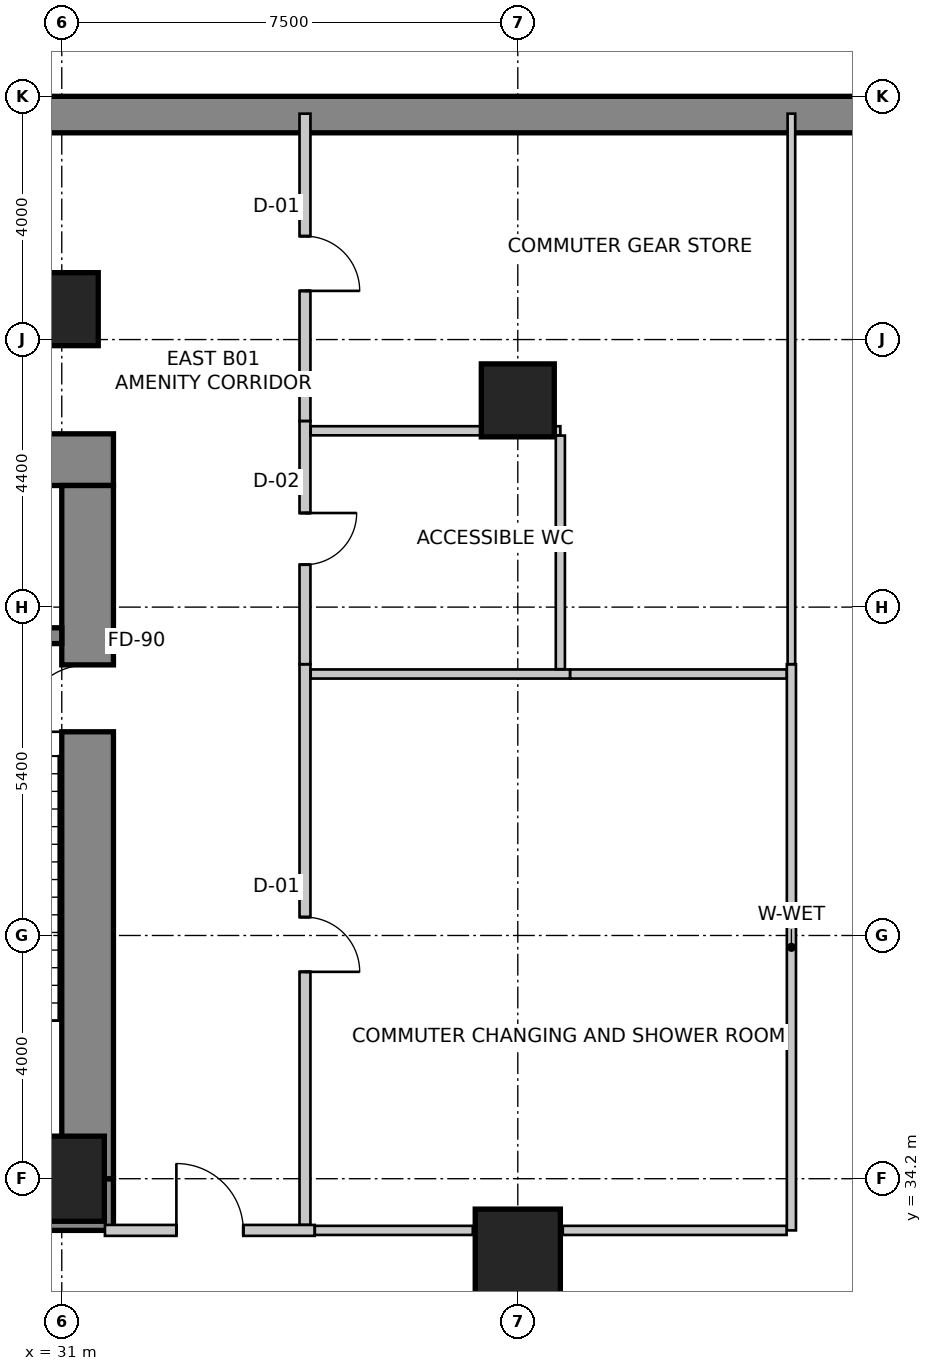
"""IFC4 building model, lengths in metres.
Left out: names, types, materials, properties, quantities, classifications, styles, units other than length and angle.
Written with IfcOpenShell. Run it as: python <this file> out.ifc"""

import sys

from ifc_helpers import new_model, si_unit, direction, frame, frame_2d, origin, origin_2d, place, context, subcontext, project, spatial, rectangle, extrude, source, transform, mapped, element, fill, save


model = new_model("IFC4")
c1 = context("Model", 3, precision=1e-05, world=origin(), true_north=direction((0.0, 1.0)))
c2 = subcontext(c1, "Body", "Model", "MODEL_VIEW")
j1 = project(units=[si_unit("LENGTHUNIT", "METRE"), si_unit("PLANEANGLEUNIT", "RADIAN")], contexts=[c1])
p1 = place(None, origin())
s1 = spatial("IfcSite", under=j1, at=p1, CompositionType="ELEMENT")
p2 = place(p1, origin())
s2 = spatial("IfcBuilding", under=s1, at=p2, CompositionType="ELEMENT")
p3 = place(p2, frame((0.0, 0.0, -5.4)))
s3 = spatial("IfcBuildingStorey", under=s2, at=p3, CompositionType="ELEMENT", Elevation=-5.4)
p4 = place(p3, frame((15.75, 46.025, 0.0), z_axis=(0.0, 0.0, 1.0), x_axis=(1.0, 0.0, 0.0)))
e1 = element("IfcWall", 1, at=p4, inside=s3, PredefinedType="SHEAR", context=c2, shape_type="SweptSolid", body=[
    extrude(rectangle(XDim=16.1, YDim=0.85, at=frame_2d((8.05, 0.0))), origin(), (0.0, 0.0, 1.0), 5.4),
])
p5 = place(p3, frame((15.75, 33.775, 0.0), z_axis=(0.0, 0.0, 1.0), x_axis=(1.0, 0.0, 0.0)))
e2 = element("IfcWall", 2, at=p5, inside=s3, PredefinedType="SHEAR", context=c2, shape_type="SweptSolid", body=[
    extrude(rectangle(XDim=16.1, YDim=0.85, at=frame_2d((8.05, 0.0))), origin(), (0.0, 0.0, 1.0), 5.4),
])
m1 = source(origin(), c2, "Body", "SweptSolid", [
    extrude(rectangle(XDim=1.3, YDim=2.15, at=frame_2d((0.65, 1.075))), frame((0.0, 0.435, 0.0), z_axis=(0.0, -1.0, 0.0), x_axis=(1.0, 0.0, 0.0)), (0.0, 0.0, 1.0), 0.87),
])
p6 = place(p5, frame((10.18, 0.0, 0.0)))
e3 = element("IfcOpeningElement", 3, at=p6, cuts=e2, PredefinedType="OPENING", context=c2, shape_type="MappedRepresentation", body=[
    mapped(m1, transform((0.0, 0.0, 0.0), scale=1.0)),
])
p7 = place(p3, frame((31.425, 34.2, 0.0), z_axis=(0.0, 0.0, 1.0), x_axis=(0.0, 1.0, 0.0)))
e4 = element("IfcWall", 4, at=p7, inside=s3, PredefinedType="SHEAR", context=c2, shape_type="SweptSolid", body=[
    extrude(rectangle(XDim=11.4, YDim=0.85, at=frame_2d((5.7, 0.0))), origin(), (0.0, 0.0, 1.0), 5.4),
])
m2 = source(origin(), c2, "Body", "SweptSolid", [
    extrude(rectangle(XDim=1.1, YDim=2.15, at=frame_2d((0.55, 1.075))), frame((0.0, 0.435, 0.0), z_axis=(0.0, -1.0, 0.0), x_axis=(1.0, 0.0, 0.0)), (0.0, 0.0, 1.0), 0.87),
])
p8 = place(p7, frame((7.35, 0.0, 0.0)))
e5 = element("IfcOpeningElement", 5, at=p8, cuts=e4, PredefinedType="OPENING", context=c2, shape_type="MappedRepresentation", body=[
    mapped(m2, transform((0.0, 0.0, 0.0), scale=1.0)),
])
p9 = place(p3, frame((27.5, 43.13, 0.0), z_axis=(0.0, 0.0, 1.0), x_axis=(1.0, 0.0, 0.0)))
e6 = element("IfcWall", 6, at=p9, inside=s3, PredefinedType="SHEAR", context=c2, shape_type="SweptSolid", body=[
    extrude(rectangle(XDim=3.5, YDim=0.26, at=frame_2d((1.75, 0.0))), origin(), (0.0, 0.0, 1.0), 5.4),
])
p10 = place(p3, frame((65.5, 51.7, 0.0), z_axis=(0.0, 0.0, 1.0), x_axis=(-1.0, 0.0, 0.0)))
e7 = element("IfcWall", 7, at=p10, inside=s3, PredefinedType="SHEAR", context=c2, shape_type="SweptSolid", body=[
    extrude(rectangle(XDim=61.0, YDim=0.6, at=frame_2d((30.5, 0.0))), origin(), (0.0, 0.0, 1.0), 5.4),
])
m3 = source(origin(), c2, "Body", "SweptSolid", [
    extrude(rectangle(XDim=1.4, YDim=1.4, at=origin_2d()), origin(), (0.0, 0.0, 1.0), 5.4),
])
for number, where, z_axis, x_axis in (
    (8, (31.0, 34.2, 0.0), (0.0, 0.0, 1.0), (1.0, 0.0, 0.0)),
    (9, (38.5, 33.0, 0.0), (0.0, 0.0, 1.0), (1.0, 0.0, 0.0)),
):
    element("IfcColumn", number, at=place(p3, frame(where, z_axis=z_axis, x_axis=x_axis)), inside=s3, PredefinedType="COLUMN", context=c2, shape_type="MappedRepresentation", body=[
        mapped(m3, transform((0.0, 0.0, 0.0), scale=1.0)),
    ])
m4 = source(origin(), c2, "Body", "SweptSolid", [
    extrude(rectangle(XDim=1.2, YDim=1.2, at=origin_2d()), origin(), (0.0, 0.0, 1.0), 5.4),
])
for number, where, z_axis, x_axis in (
    (10, (31.0, 48.5, 0.0), (0.0, 0.0, 1.0), (1.0, 0.0, 0.0)),
    (11, (38.5, 47.0, 0.0), (0.0, 0.0, 1.0), (1.0, 0.0, 0.0)),
):
    element("IfcColumn", number, at=place(p3, frame(where, z_axis=z_axis, x_axis=x_axis)), inside=s3, PredefinedType="COLUMN", context=c2, shape_type="MappedRepresentation", body=[
        mapped(m4, transform((0.0, 0.0, 0.0), scale=1.0)),
    ])
p11 = place(p3, frame((31.71, 33.35, 0.0), z_axis=(0.0, 0.0, 1.0), x_axis=(1.0, 0.0, 0.0)))
e12 = element("IfcWall", 12, at=p11, inside=s3, PredefinedType="PARTITIONING", context=c2, shape_type="SweptSolid", body=[
    extrude(rectangle(XDim=3.45, YDim=0.18, at=frame_2d((1.725, 0.0))), origin(), (0.0, 0.0, 1.0), 5.1),
])
m5 = source(origin(), c2, "Body", "SweptSolid", [
    extrude(rectangle(XDim=1.1, YDim=2.15, at=frame_2d((0.55, 1.075))), frame((0.0, 0.1, 0.0), z_axis=(0.0, -1.0, 0.0), x_axis=(1.0, 0.0, 0.0)), (0.0, 0.0, 1.0), 0.2),
])
p12 = place(p11, frame((1.175, 0.0, 0.0)))
e13 = element("IfcOpeningElement", 13, at=p12, cuts=e12, PredefinedType="OPENING", context=c2, shape_type="MappedRepresentation", body=[
    mapped(m5, transform((0.0, 0.0, 0.0), scale=1.0)),
])
p13 = place(p3, frame((43.0, 33.35, 0.0), z_axis=(0.0, 0.0, 1.0), x_axis=(0.0, 1.0, 0.0)))
e14 = element("IfcWall", 14, at=p13, inside=s3, PredefinedType="PARTITIONING", context=c2, shape_type="SweptSolid", body=[
    extrude(rectangle(XDim=9.31, YDim=0.15, at=frame_2d((4.655, 0.0))), origin(), (0.0, 0.0, 1.0), 3.892),
])
p14 = place(p3, frame((39.24, 33.35, 0.0), z_axis=(0.0, 0.0, 1.0), x_axis=(1.0, 0.0, 0.0)))
e15 = element("IfcWall", 15, at=p14, inside=s3, PredefinedType="PARTITIONING", context=c2, shape_type="SweptSolid", body=[
    extrude(rectangle(XDim=3.681, YDim=0.15, at=frame_2d((1.84, 0.0))), origin(), (0.0, 0.0, 1.0), 3.892),
])
p15 = place(p3, frame((35.162, 33.35, 0.0), z_axis=(0.0, 0.0, 1.0), x_axis=(1.0, 0.0, 0.0)))
e16 = element("IfcWall", 16, at=p15, inside=s3, PredefinedType="PARTITIONING", context=c2, shape_type="SweptSolid", body=[
    extrude(rectangle(XDim=2.598, YDim=0.15, at=frame_2d((1.299, 0.0))), origin(), (0.0, 0.0, 1.0), 5.1),
])
p16 = place(p3, frame((43.0, 42.662, 0.0), z_axis=(0.0, 0.0, 1.0), x_axis=(0.0, 1.0, 0.0)))
e17 = element("IfcWall", 17, at=p16, inside=s3, PredefinedType="PARTITIONING", context=c2, shape_type="SweptSolid", body=[
    extrude(rectangle(XDim=9.053, YDim=0.125, at=frame_2d((4.526, 0.0))), origin(), (0.0, 0.0, 1.0), 4.142),
])
p17 = place(p3, frame((35.0, 42.66, 0.0), z_axis=(0.0, 0.0, 1.0), x_axis=(0.0, -1.0, 0.0)))
e18 = element("IfcWall", 18, at=p17, inside=s3, PredefinedType="PARTITIONING", context=c2, shape_type="SweptSolid", body=[
    extrude(rectangle(XDim=9.216, YDim=0.18, at=frame_2d((4.608, 0.0))), origin(), (0.0, 0.0, 1.0), 5.1),
])
m6 = source(origin(), c2, "Body", "SweptSolid", [
    extrude(rectangle(XDim=0.9, YDim=2.15, at=frame_2d((0.45, 1.075))), frame((0.0, 0.1, 0.0), z_axis=(0.0, -1.0, 0.0), x_axis=(1.0, 0.0, 0.0)), (0.0, 0.0, 1.0), 0.2),
])
p18 = place(p17, frame((4.158, 0.0, 0.0)))
e19 = element("IfcOpeningElement", 19, at=p18, cuts=e18, PredefinedType="OPENING", context=c2, shape_type="MappedRepresentation", body=[
    mapped(m6, transform((0.0, 0.0, 0.0), scale=1.0)),
])
p19 = place(p3, frame((35.0, 46.66, 0.0), z_axis=(0.0, 0.0, 1.0), x_axis=(0.0, -1.0, 0.0)))
e20 = element("IfcWall", 20, at=p19, inside=s3, PredefinedType="PARTITIONING", context=c2, shape_type="SweptSolid", body=[
    extrude(rectangle(XDim=3.998, YDim=0.18, at=frame_2d((1.999, 0.0))), origin(), (0.0, 0.0, 1.0), 5.1),
])
m7 = source(origin(), c2, "Body", "SweptSolid", [
    extrude(rectangle(XDim=0.85, YDim=2.15, at=frame_2d((0.425, 1.075))), frame((0.0, 0.1, 0.0), z_axis=(0.0, -1.0, 0.0), x_axis=(1.0, 0.0, 0.0)), (0.0, 0.0, 1.0), 0.2),
])
p20 = place(p19, frame((1.512, 0.0, 0.0)))
e21 = element("IfcOpeningElement", 21, at=p20, cuts=e20, PredefinedType="OPENING", context=c2, shape_type="MappedRepresentation", body=[
    mapped(m7, transform((0.0, 0.0, 0.0), scale=1.0)),
])
p21 = place(p3, frame((35.0, 51.715, 0.0), z_axis=(0.0, 0.0, 1.0), x_axis=(0.0, -1.0, 0.0)))
e22 = element("IfcWall", 22, at=p21, inside=s3, PredefinedType="PARTITIONING", context=c2, shape_type="SweptSolid", body=[
    extrude(rectangle(XDim=5.053, YDim=0.18, at=frame_2d((2.526, 0.0))), origin(), (0.0, 0.0, 1.0), 4.142),
])
p22 = place(p21, frame((2.015, 0.0, 0.0)))
e23 = element("IfcOpeningElement", 23, at=p22, cuts=e22, PredefinedType="OPENING", context=c2, shape_type="MappedRepresentation", body=[
    mapped(m6, transform((0.0, 0.0, 0.0), scale=1.0)),
])
p23 = place(p3, frame((35.094, 42.5, 0.0), z_axis=(0.0, 0.0, 1.0), x_axis=(1.0, 0.0, 0.0)))
e24 = element("IfcWall", 24, at=p23, inside=s3, PredefinedType="PARTITIONING", context=c2, shape_type="SweptSolid", body=[
    extrude(rectangle(XDim=4.266, YDim=0.15, at=frame_2d((2.133, 0.0))), origin(), (0.0, 0.0, 1.0), 4.142),
])
p24 = place(p3, frame((39.362, 42.5, 0.0), z_axis=(0.0, 0.0, 1.0), x_axis=(1.0, 0.0, 0.0)))
e25 = element("IfcWall", 25, at=p24, inside=s3, PredefinedType="PARTITIONING", context=c2, shape_type="SweptSolid", body=[
    extrude(rectangle(XDim=3.559, YDim=0.15, at=frame_2d((1.779, 0.0))), origin(), (0.0, 0.0, 1.0), 5.1),
])
p25 = place(p3, frame((35.094, 46.5, 0.0), z_axis=(0.0, 0.0, 1.0), x_axis=(1.0, 0.0, 0.0)))
e26 = element("IfcWall", 26, at=p25, inside=s3, PredefinedType="PARTITIONING", context=c2, shape_type="SweptSolid", body=[
    extrude(rectangle(XDim=4.106, YDim=0.15, at=frame_2d((2.053, 0.0))), origin(), (0.0, 0.0, 1.0), 4.142),
])
p26 = place(p3, frame((39.2, 46.421, 0.0), z_axis=(0.0, 0.0, 1.0), x_axis=(0.0, -1.0, 0.0)))
e27 = element("IfcWall", 27, at=p26, inside=s3, PredefinedType="PARTITIONING", context=c2, shape_type="SweptSolid", body=[
    extrude(rectangle(XDim=3.842, YDim=0.15, at=frame_2d((1.921, 0.0))), origin(), (0.0, 0.0, 1.0), 5.1),
])
p27 = place(p3, frame((39.02, 33.35, 0.0), z_axis=(0.0, 0.0, 1.0), x_axis=(-1.0, 0.0, 0.0)))
e28 = element("IfcWall", 28, at=p27, inside=s3, PredefinedType="PARTITIONING", context=c2, shape_type="SweptSolid", body=[
    extrude(rectangle(XDim=1.04, YDim=0.15, at=frame_2d((0.52, 0.0))), origin(), (0.0, 0.0, 1.0), 3.892),
])
m8 = source(origin(), c2, "Body", "SweptSolid", [
    extrude(rectangle(XDim=1.1, YDim=2.15, at=frame_2d((0.55, 1.075))), frame((0.0, 0.025, 0.0), z_axis=(0.0, -1.0, 0.0), x_axis=(1.0, 0.0, 0.0)), (0.0, 0.0, 1.0), 0.05),
])
p28 = place(p8, origin())
e29 = element("IfcDoor", 29, at=p28, inside=s3, OperationType="SINGLE_SWING_LEFT", PredefinedType="DOOR", context=c2, shape_type="MappedRepresentation", body=[
    mapped(m8, transform((0.0, 0.0, 0.0), scale=1.0)),
])
fill(e5, e29)
p29 = place(p12, origin())
e30 = element("IfcDoor", 30, at=p29, inside=s3, OperationType="SINGLE_SWING_LEFT", PredefinedType="DOOR", context=c2, shape_type="MappedRepresentation", body=[
    mapped(m8, transform((0.0, 0.0, 0.0), scale=1.0)),
])
fill(e13, e30)
m9 = source(origin(), c2, "Body", "SweptSolid", [
    extrude(rectangle(XDim=0.9, YDim=2.15, at=frame_2d((0.45, 1.075))), frame((0.0, 0.025, 0.0), z_axis=(0.0, -1.0, 0.0), x_axis=(1.0, 0.0, 0.0)), (0.0, 0.0, 1.0), 0.05),
])
p30 = place(p18, origin())
e31 = element("IfcDoor", 31, at=p30, inside=s3, OperationType="SINGLE_SWING_RIGHT", PredefinedType="DOOR", context=c2, shape_type="MappedRepresentation", body=[
    mapped(m9, transform((0.0, 0.0, 0.0), scale=1.0)),
])
fill(e19, e31)
m10 = source(origin(), c2, "Body", "SweptSolid", [
    extrude(rectangle(XDim=0.85, YDim=2.15, at=frame_2d((0.425, 1.075))), frame((0.0, 0.025, 0.0), z_axis=(0.0, -1.0, 0.0), x_axis=(1.0, 0.0, 0.0)), (0.0, 0.0, 1.0), 0.05),
])
p31 = place(p20, origin())
e32 = element("IfcDoor", 32, at=p31, inside=s3, OperationType="SINGLE_SWING_LEFT", PredefinedType="DOOR", context=c2, shape_type="MappedRepresentation", body=[
    mapped(m10, transform((0.0, 0.0, 0.0), scale=1.0)),
])
fill(e21, e32)
p32 = place(p22, origin())
e33 = element("IfcDoor", 33, at=p32, inside=s3, OperationType="SINGLE_SWING_RIGHT", PredefinedType="DOOR", context=c2, shape_type="MappedRepresentation", body=[
    mapped(m9, transform((0.0, 0.0, 0.0), scale=1.0)),
])
fill(e23, e33)
save(model, sys.argv[1])
